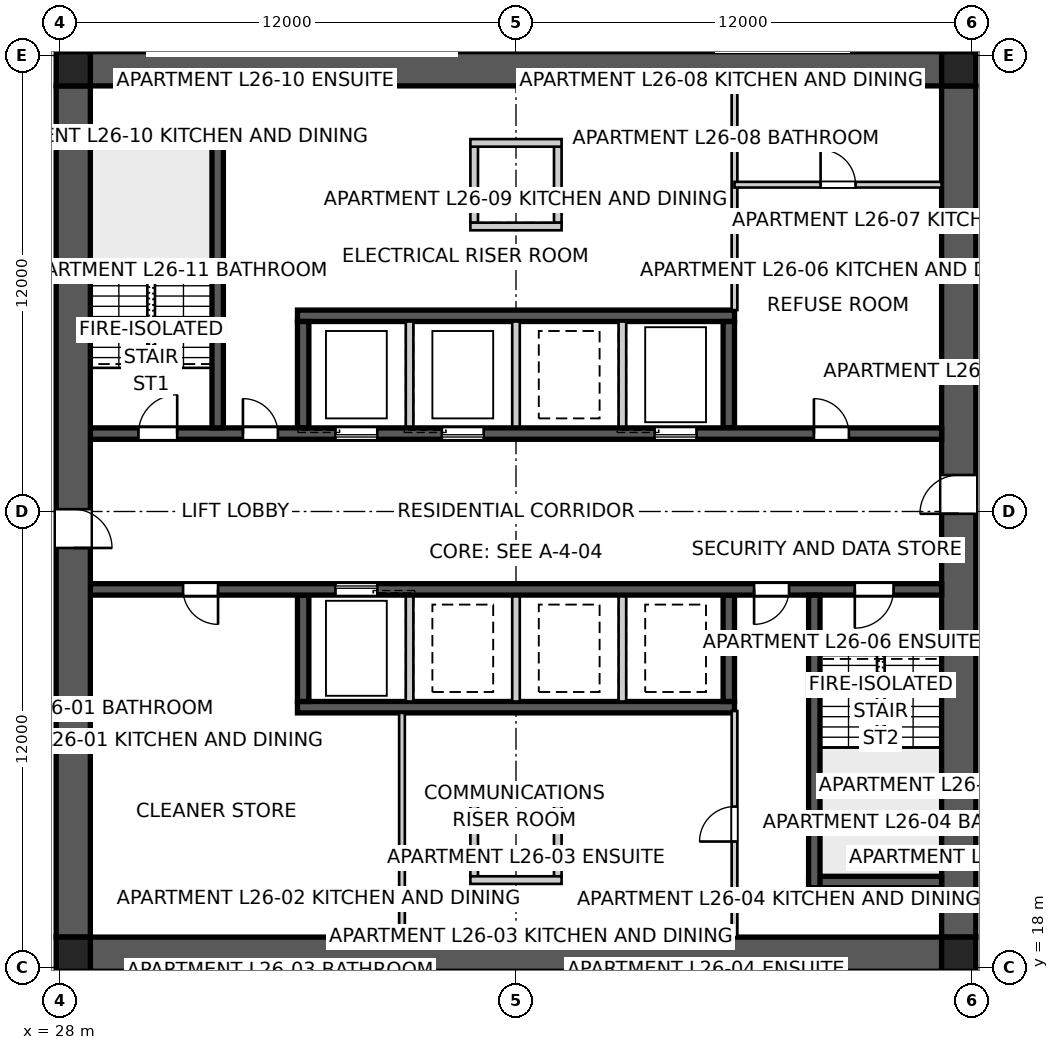
"""IFC4 building model, lengths in metres.
Left out: names, types, materials, properties, quantities, classifications, styles, units other than length and angle.
Written with IfcOpenShell. Run it as: python <this file> out.ifc"""

import sys

from ifc_helpers import new_model, si_unit, direction, frame, frame_2d, origin, origin_2d, place, context, subcontext, project, spatial, polyline, rectangle, outline, extrude, element, fill, save


model = new_model("IFC4")
c1 = context("Model", 3, precision=1e-05, world=origin(), true_north=direction((0.0, 1.0)))
c2 = subcontext(c1, "Body", "Model", "MODEL_VIEW")
j1 = project(units=[si_unit("LENGTHUNIT", "METRE"), si_unit("PLANEANGLEUNIT", "RADIAN")], contexts=[c1])
p1 = place(None, origin())
s1 = spatial("IfcSite", under=j1, at=p1, CompositionType="ELEMENT")
p2 = place(p1, origin())
s2 = spatial("IfcBuilding", under=s1, at=p2, CompositionType="ELEMENT")
p3 = place(p2, frame((0.0, 0.0, 96.4)))
s3 = spatial("IfcBuildingStorey", under=s2, at=p3, CompositionType="ELEMENT", Elevation=96.4)
for number, where, z_axis, x_axis in (
    (1, (28.8, 41.65, 0.0), (0.0, 0.0, 1.0), (1.0, 0.0, 0.0)),
    (2, (51.2, 18.35, 0.0), (0.0, 0.0, 1.0), (-1.0, 0.0, 0.0)),
):
    element("IfcWall", number, at=place(p3, frame(where, z_axis=z_axis, x_axis=x_axis)), inside=s3, PredefinedType="SHEAR", context=c2, shape_type="SweptSolid", body=[
        extrude(outline(polyline([(0.0, -0.45), (22.4, -0.45), (22.4, -0.025), (22.85, -0.025), (22.85, 0.025), (22.4, 0.025), (22.4, 0.45), (0.0, 0.45), (0.0, 0.025), (-0.45, 0.025), (-0.45, -0.025), (0.0, -0.025), (0.0, -0.45)])), origin(), (0.0, 0.0, 1.0), 3.4),
    ])
p4 = place(p3, frame((51.65, 18.8, 0.0), z_axis=(0.0, 0.0, 1.0), x_axis=(0.0, 1.0, 0.0)))
e3 = element("IfcWall", 3, at=p4, inside=s3, PredefinedType="SHEAR", context=c2, shape_type="SweptSolid", body=[
    extrude(outline(polyline([(0.0, -0.45), (22.4, -0.45), (22.4, -0.025), (22.85, -0.025), (22.85, 0.025), (22.4, 0.025), (22.4, 0.45), (0.0, 0.45), (0.0, 0.025), (-0.45, 0.025), (-0.45, -0.025), (0.0, -0.025), (0.0, -0.45)])), origin(), (0.0, 0.0, 1.0), 3.4),
])
p5 = place(p4, frame((11.14, 0.0, 0.0)))
e4 = element("IfcOpeningElement", 4, at=p5, cuts=e3, PredefinedType="OPENING", context=c2, shape_type="SweptSolid", body=[
    extrude(rectangle(XDim=1.02, YDim=2.4, at=frame_2d((0.51, 1.2))), frame((0.0, 0.46, 0.0), z_axis=(0.0, -1.0, 0.0), x_axis=(1.0, 0.0, 0.0)), (0.0, 0.0, 1.0), 0.92),
])
p6 = place(p3, frame((28.35, 41.2, 0.0), z_axis=(0.0, 0.0, 1.0), x_axis=(0.0, -1.0, 0.0)))
e5 = element("IfcWall", 5, at=p6, inside=s3, PredefinedType="SHEAR", context=c2, shape_type="SweptSolid", body=[
    extrude(outline(polyline([(0.0, -0.45), (22.4, -0.45), (22.4, -0.025), (22.85, -0.025), (22.85, 0.025), (22.4, 0.025), (22.4, 0.45), (0.0, 0.45), (0.0, 0.025), (-0.45, 0.025), (-0.45, -0.025), (0.0, -0.025), (0.0, -0.45)])), origin(), (0.0, 0.0, 1.0), 3.4),
])
p7 = place(p6, frame((11.14, 0.0, 0.0)))
e6 = element("IfcOpeningElement", 6, at=p7, cuts=e5, PredefinedType="OPENING", context=c2, shape_type="SweptSolid", body=[
    extrude(rectangle(XDim=1.02, YDim=2.4, at=frame_2d((0.51, 1.2))), frame((0.0, 0.46, 0.0), z_axis=(0.0, -1.0, 0.0), x_axis=(1.0, 0.0, 0.0)), (0.0, 0.0, 1.0), 0.92),
])
p8 = place(p3, frame((28.8, 32.05, 0.0), z_axis=(0.0, 0.0, 1.0), x_axis=(1.0, 0.0, 0.0)))
e7 = element("IfcWall", 7, at=p8, inside=s3, PredefinedType="SHEAR", context=c2, shape_type="SweptSolid", body=[
    extrude(rectangle(XDim=22.4, YDim=0.3, at=frame_2d((11.2, 0.0))), origin(), (0.0, 0.0, 1.0), 3.4),
])
p9 = place(p8, frame((19.04, 0.0, 0.0)))
e8 = element("IfcOpeningElement", 8, at=p9, cuts=e7, PredefinedType="OPENING", context=c2, shape_type="SweptSolid", body=[
    extrude(rectangle(XDim=0.92, YDim=2.1, at=frame_2d((0.46, 1.05))), frame((0.0, 0.16, 0.0), z_axis=(0.0, -1.0, 0.0), x_axis=(1.0, 0.0, 0.0)), (0.0, 0.0, 1.0), 0.32),
])
p10 = place(p8, frame((1.265, 0.0, 0.0)))
e9 = element("IfcOpeningElement", 9, at=p10, cuts=e7, PredefinedType="OPENING", context=c2, shape_type="SweptSolid", body=[
    extrude(rectangle(XDim=1.02, YDim=2.1, at=frame_2d((0.51, 1.05))), frame((0.0, 0.16, 0.0), z_axis=(0.0, -1.0, 0.0), x_axis=(1.0, 0.0, 0.0)), (0.0, 0.0, 1.0), 0.32),
])
p11 = place(p8, frame((4.015, 0.0, 0.0)))
e10 = element("IfcOpeningElement", 10, at=p11, cuts=e7, PredefinedType="OPENING", context=c2, shape_type="SweptSolid", body=[
    extrude(rectangle(XDim=0.92, YDim=2.1, at=frame_2d((0.46, 1.05))), frame((0.0, 0.16, 0.0), z_axis=(0.0, -1.0, 0.0), x_axis=(1.0, 0.0, 0.0)), (0.0, 0.0, 1.0), 0.32),
])
p12 = place(p8, frame((6.45, 0.0, 0.0)))
e11 = element("IfcOpeningElement", 11, at=p12, cuts=e7, PredefinedType="OPENING", context=c2, shape_type="SweptSolid", body=[
    extrude(rectangle(XDim=1.1, YDim=2.1, at=frame_2d((0.55, 1.05))), frame((0.0, 0.16, 0.0), z_axis=(0.0, -1.0, 0.0), x_axis=(1.0, 0.0, 0.0)), (0.0, 0.0, 1.0), 0.32),
])
p13 = place(p8, frame((9.25, 0.0, 0.0)))
e12 = element("IfcOpeningElement", 12, at=p13, cuts=e7, PredefinedType="OPENING", context=c2, shape_type="SweptSolid", body=[
    extrude(rectangle(XDim=1.1, YDim=2.1, at=frame_2d((0.55, 1.05))), frame((0.0, 0.16, 0.0), z_axis=(0.0, -1.0, 0.0), x_axis=(1.0, 0.0, 0.0)), (0.0, 0.0, 1.0), 0.32),
])
p14 = place(p8, frame((14.85, 0.0, 0.0)))
e13 = element("IfcOpeningElement", 13, at=p14, cuts=e7, PredefinedType="OPENING", context=c2, shape_type="SweptSolid", body=[
    extrude(rectangle(XDim=1.1, YDim=2.1, at=frame_2d((0.55, 1.05))), frame((0.0, 0.16, 0.0), z_axis=(0.0, -1.0, 0.0), x_axis=(1.0, 0.0, 0.0)), (0.0, 0.0, 1.0), 0.32),
])
p15 = place(p3, frame((51.2, 27.95, 0.0), z_axis=(0.0, 0.0, 1.0), x_axis=(-1.0, 0.0, 0.0)))
e14 = element("IfcWall", 14, at=p15, inside=s3, PredefinedType="SHEAR", context=c2, shape_type="SweptSolid", body=[
    extrude(rectangle(XDim=22.4, YDim=0.3, at=frame_2d((11.2, 0.0))), origin(), (0.0, 0.0, 1.0), 3.4),
])
p16 = place(p15, frame((19.04, 0.0, 0.0)))
e15 = element("IfcOpeningElement", 15, at=p16, cuts=e14, PredefinedType="OPENING", context=c2, shape_type="SweptSolid", body=[
    extrude(rectangle(XDim=0.92, YDim=2.1, at=frame_2d((0.46, 1.05))), frame((0.0, 0.16, 0.0), z_axis=(0.0, -1.0, 0.0), x_axis=(1.0, 0.0, 0.0)), (0.0, 0.0, 1.0), 0.32),
])
p17 = place(p15, frame((1.265, 0.0, 0.0)))
e16 = element("IfcOpeningElement", 16, at=p17, cuts=e14, PredefinedType="OPENING", context=c2, shape_type="SweptSolid", body=[
    extrude(rectangle(XDim=1.02, YDim=2.1, at=frame_2d((0.51, 1.05))), frame((0.0, 0.16, 0.0), z_axis=(0.0, -1.0, 0.0), x_axis=(1.0, 0.0, 0.0)), (0.0, 0.0, 1.0), 0.32),
])
p18 = place(p15, frame((4.015, 0.0, 0.0)))
e17 = element("IfcOpeningElement", 17, at=p18, cuts=e14, PredefinedType="OPENING", context=c2, shape_type="SweptSolid", body=[
    extrude(rectangle(XDim=0.92, YDim=2.1, at=frame_2d((0.46, 1.05))), frame((0.0, 0.16, 0.0), z_axis=(0.0, -1.0, 0.0), x_axis=(1.0, 0.0, 0.0)), (0.0, 0.0, 1.0), 0.32),
])
p19 = place(p15, frame((14.85, 0.0, 0.0)))
e18 = element("IfcOpeningElement", 18, at=p19, cuts=e14, PredefinedType="OPENING", context=c2, shape_type="SweptSolid", body=[
    extrude(rectangle(XDim=1.1, YDim=2.1, at=frame_2d((0.55, 1.05))), frame((0.0, 0.16, 0.0), z_axis=(0.0, -1.0, 0.0), x_axis=(1.0, 0.0, 0.0)), (0.0, 0.0, 1.0), 0.32),
])
for number, where, z_axis, x_axis in (
    (19, (34.25, 35.15, 0.0), (0.0, 0.0, 1.0), (1.0, 0.0, 0.0)),
    (20, (45.75, 24.85, 0.0), (0.0, 0.0, 1.0), (-1.0, 0.0, 0.0)),
):
    element("IfcWall", number, at=place(p3, frame(where, z_axis=z_axis, x_axis=x_axis)), inside=s3, PredefinedType="SHEAR", context=c2, shape_type="SweptSolid", body=[
        extrude(rectangle(XDim=11.5, YDim=0.3, at=frame_2d((5.75, 0.0))), origin(), (0.0, 0.0, 1.0), 3.4),
    ])
for number, where, z_axis, x_axis in (
    (21, (34.4, 32.2, 0.0), (0.0, 0.0, 1.0), (0.0, 1.0, 0.0)),
    (22, (45.6, 27.8, 0.0), (0.0, 0.0, 1.0), (0.0, -1.0, 0.0)),
):
    element("IfcWall", number, at=place(p3, frame(where, z_axis=z_axis, x_axis=x_axis)), inside=s3, PredefinedType="SHEAR", context=c2, shape_type="SweptSolid", body=[
        extrude(rectangle(XDim=2.8, YDim=0.3, at=frame_2d((1.4, 0.0))), origin(), (0.0, 0.0, 1.0), 3.4),
    ])
for number, where, z_axis, x_axis in (
    (23, (37.2, 32.2, 0.0), (0.0, 0.0, 1.0), (0.0, 1.0, 0.0)),
    (24, (42.8, 27.8, 0.0), (0.0, 0.0, 1.0), (0.0, -1.0, 0.0)),
    (25, (40.0, 32.2, 0.0), (0.0, 0.0, 1.0), (0.0, 1.0, 0.0)),
    (26, (40.0, 27.8, 0.0), (0.0, 0.0, 1.0), (0.0, -1.0, 0.0)),
    (27, (42.8, 32.2, 0.0), (0.0, 0.0, 1.0), (0.0, 1.0, 0.0)),
    (28, (37.2, 27.8, 0.0), (0.0, 0.0, 1.0), (0.0, -1.0, 0.0)),
):
    element("IfcWall", number, at=place(p3, frame(where, z_axis=z_axis, x_axis=x_axis)), inside=s3, PredefinedType="SOLIDWALL", context=c2, shape_type="SweptSolid", body=[
        extrude(rectangle(XDim=2.8, YDim=0.2, at=frame_2d((1.4, 0.0))), origin(), (0.0, 0.0, 1.0), 3.4),
    ])
for number, where, z_axis, x_axis in (
    (29, (45.6, 32.2, 0.0), (0.0, 0.0, 1.0), (0.0, 1.0, 0.0)),
    (30, (34.4, 27.8, 0.0), (0.0, 0.0, 1.0), (0.0, -1.0, 0.0)),
):
    element("IfcWall", number, at=place(p3, frame(where, z_axis=z_axis, x_axis=x_axis)), inside=s3, PredefinedType="SHEAR", context=c2, shape_type="SweptSolid", body=[
        extrude(rectangle(XDim=2.8, YDim=0.3, at=frame_2d((1.4, 0.0))), origin(), (0.0, 0.0, 1.0), 3.4),
    ])
p20 = place(p3, frame((32.15, 32.2, 0.0), z_axis=(0.0, 0.0, 1.0), x_axis=(0.0, 1.0, 0.0)))
e31 = element("IfcWall", 31, at=p20, inside=s3, PredefinedType="SHEAR", context=c2, shape_type="SweptSolid", body=[
    extrude(rectangle(XDim=7.7, YDim=0.3, at=frame_2d((3.85, 0.0))), origin(), (0.0, 0.0, 1.0), 3.4),
])
p21 = place(p3, frame((28.8, 39.75, 0.0), z_axis=(0.0, 0.0, 1.0), x_axis=(1.0, 0.0, 0.0)))
e32 = element("IfcWall", 32, at=p21, inside=s3, PredefinedType="SHEAR", context=c2, shape_type="SweptSolid", body=[
    extrude(rectangle(XDim=3.5, YDim=0.3, at=frame_2d((1.75, 0.0))), origin(), (0.0, 0.0, 1.0), 3.4),
])
p22 = place(p3, frame((47.85, 27.8, 0.0), z_axis=(0.0, 0.0, 1.0), x_axis=(0.0, -1.0, 0.0)))
e33 = element("IfcWall", 33, at=p22, inside=s3, PredefinedType="SHEAR", context=c2, shape_type="SweptSolid", body=[
    extrude(rectangle(XDim=7.7, YDim=0.3, at=frame_2d((3.85, 0.0))), origin(), (0.0, 0.0, 1.0), 3.4),
])
p23 = place(p3, frame((51.2, 20.25, 0.0), z_axis=(0.0, 0.0, 1.0), x_axis=(-1.0, 0.0, 0.0)))
e34 = element("IfcWall", 34, at=p23, inside=s3, PredefinedType="SHEAR", context=c2, shape_type="SweptSolid", body=[
    extrude(rectangle(XDim=3.5, YDim=0.3, at=frame_2d((1.75, 0.0))), origin(), (0.0, 0.0, 1.0), 3.4),
])
for number, where, z_axis, x_axis in (
    (35, (38.9, 37.6, 0.0), (0.0, 0.0, 1.0), (0.0, 1.0, 0.0)),
    (36, (41.1, 37.6, 0.0), (0.0, 0.0, 1.0), (0.0, 1.0, 0.0)),
):
    element("IfcWall", number, at=place(p3, frame(where, z_axis=z_axis, x_axis=x_axis)), inside=s3, PredefinedType="SOLIDWALL", context=c2, shape_type="SweptSolid", body=[
        extrude(rectangle(XDim=2.0, YDim=0.2, at=frame_2d((1.0, 0.0))), origin(), (0.0, 0.0, 1.0), 3.4),
    ])
for number, where, z_axis, x_axis in (
    (37, (38.8, 37.5, 0.0), (0.0, 0.0, 1.0), (1.0, 0.0, 0.0)),
    (38, (38.8, 39.7, 0.0), (0.0, 0.0, 1.0), (1.0, 0.0, 0.0)),
):
    element("IfcWall", number, at=place(p3, frame(where, z_axis=z_axis, x_axis=x_axis)), inside=s3, PredefinedType="SOLIDWALL", context=c2, shape_type="SweptSolid", body=[
        extrude(rectangle(XDim=2.4, YDim=0.2, at=frame_2d((1.2, 0.0))), origin(), (0.0, 0.0, 1.0), 3.4),
    ])
for number, where, z_axis, x_axis in (
    (39, (38.9, 22.4, 0.0), (0.0, 0.0, 1.0), (0.0, -1.0, 0.0)),
    (40, (41.1, 22.4, 0.0), (0.0, 0.0, 1.0), (0.0, -1.0, 0.0)),
):
    element("IfcWall", number, at=place(p3, frame(where, z_axis=z_axis, x_axis=x_axis)), inside=s3, PredefinedType="SOLIDWALL", context=c2, shape_type="SweptSolid", body=[
        extrude(rectangle(XDim=2.0, YDim=0.2, at=frame_2d((1.0, 0.0))), origin(), (0.0, 0.0, 1.0), 3.4),
    ])
for number, where, z_axis, x_axis in (
    (41, (38.8, 22.5, 0.0), (0.0, 0.0, 1.0), (1.0, 0.0, 0.0)),
    (42, (38.8, 20.3, 0.0), (0.0, 0.0, 1.0), (1.0, 0.0, 0.0)),
):
    element("IfcWall", number, at=place(p3, frame(where, z_axis=z_axis, x_axis=x_axis)), inside=s3, PredefinedType="SOLIDWALL", context=c2, shape_type="SweptSolid", body=[
        extrude(rectangle(XDim=2.4, YDim=0.2, at=frame_2d((1.2, 0.0))), origin(), (0.0, 0.0, 1.0), 3.4),
    ])
for number, where, z_axis, x_axis in (
    (43, (28.35, 18.35, 0.0), (0.0, 0.0, 1.0), (1.0, 0.0, 0.0)),
    (44, (51.65, 18.35, 0.0), (0.0, 0.0, 1.0), (1.0, 0.0, 0.0)),
    (45, (51.65, 41.65, 0.0), (0.0, 0.0, 1.0), (1.0, 0.0, 0.0)),
    (46, (28.35, 41.65, 0.0), (0.0, 0.0, 1.0), (1.0, 0.0, 0.0)),
):
    element("IfcColumn", number, at=place(p3, frame(where, z_axis=z_axis, x_axis=x_axis)), inside=s3, PredefinedType="COLUMN", context=c2, shape_type="SweptSolid", body=[
        extrude(rectangle(XDim=0.9, YDim=0.9, at=origin_2d()), origin(), (0.0, 0.0, 1.0), 3.4),
    ])
p24 = place(p3, frame((45.75, 41.2, 0.0), z_axis=(0.0, 0.0, 1.0), x_axis=(0.0, -1.0, 0.0)))
e47 = element("IfcWall", 47, at=p24, inside=s3, PredefinedType="SOLIDWALL", context=c2, shape_type="SweptSolid", body=[
    extrude(rectangle(XDim=5.9, YDim=0.15, at=frame_2d((2.95, 0.0))), origin(), (0.0, 0.0, 1.0), 3.25),
])
p25 = place(p3, frame((45.75, 38.6, 0.0), z_axis=(0.0, 0.0, 1.0), x_axis=(1.0, 0.0, 0.0)))
e48 = element("IfcWall", 48, at=p25, inside=s3, PredefinedType="SOLIDWALL", context=c2, shape_type="SweptSolid", body=[
    extrude(rectangle(XDim=5.45, YDim=0.15, at=frame_2d((2.725, 0.0))), origin(), (0.0, 0.0, 1.0), 3.25),
])
p26 = place(p25, frame((2.265, 0.0, 0.0)))
e49 = element("IfcOpeningElement", 49, at=p26, cuts=e48, PredefinedType="OPENING", context=c2, shape_type="SweptSolid", body=[
    extrude(rectangle(XDim=0.92, YDim=2.1, at=frame_2d((0.46, 1.05))), frame((0.0, 0.085, 0.0), z_axis=(0.0, -1.0, 0.0), x_axis=(1.0, 0.0, 0.0)), (0.0, 0.0, 1.0), 0.17),
])
p27 = place(p3, frame((45.75, 18.8, 0.0), z_axis=(0.0, 0.0, 1.0), x_axis=(0.0, 1.0, 0.0)))
e50 = element("IfcWall", 50, at=p27, inside=s3, PredefinedType="SOLIDWALL", context=c2, shape_type="SweptSolid", body=[
    extrude(rectangle(XDim=5.95, YDim=0.15, at=frame_2d((2.975, 0.0))), origin(), (0.0, 0.0, 1.0), 3.25),
])
p28 = place(p27, frame((2.515, 0.0, 0.0)))
e51 = element("IfcOpeningElement", 51, at=p28, cuts=e50, PredefinedType="OPENING", context=c2, shape_type="SweptSolid", body=[
    extrude(rectangle(XDim=0.92, YDim=2.1, at=frame_2d((0.46, 1.05))), frame((0.0, 0.085, 0.0), z_axis=(0.0, -1.0, 0.0), x_axis=(1.0, 0.0, 0.0)), (0.0, 0.0, 1.0), 0.17),
])
p29 = place(p3, frame((37.0, 18.8, 0.0), z_axis=(0.0, 0.0, 1.0), x_axis=(0.0, 1.0, 0.0)))
e52 = element("IfcWall", 52, at=p29, inside=s3, PredefinedType="SOLIDWALL", context=c2, shape_type="SweptSolid", body=[
    extrude(rectangle(XDim=5.9, YDim=0.15, at=frame_2d((2.95, 0.0))), origin(), (0.0, 0.0, 1.0), 3.25),
])
p30 = place(p9, origin())
e53 = element("IfcDoor", 53, at=p30, inside=s3, OperationType="SINGLE_SWING_LEFT", PredefinedType="DOOR", context=c2, shape_type="SweptSolid", body=[
    extrude(rectangle(XDim=0.92, YDim=2.1, at=frame_2d((0.46, 1.05))), frame((0.0, 0.025, 0.0), z_axis=(0.0, -1.0, 0.0), x_axis=(1.0, 0.0, 0.0)), (0.0, 0.0, 1.0), 0.05),
])
fill(e8, e53)
p31 = place(p16, origin())
e54 = element("IfcDoor", 54, at=p31, inside=s3, OperationType="SINGLE_SWING_LEFT", PredefinedType="DOOR", context=c2, shape_type="SweptSolid", body=[
    extrude(rectangle(XDim=0.92, YDim=2.1, at=frame_2d((0.46, 1.05))), frame((0.0, 0.025, 0.0), z_axis=(0.0, -1.0, 0.0), x_axis=(1.0, 0.0, 0.0)), (0.0, 0.0, 1.0), 0.05),
])
fill(e15, e54)
p32 = place(p17, origin())
e55 = element("IfcDoor", 55, at=p32, inside=s3, OperationType="SINGLE_SWING_RIGHT", PredefinedType="DOOR", context=c2, shape_type="SweptSolid", body=[
    extrude(rectangle(XDim=1.02, YDim=2.1, at=frame_2d((0.51, 1.05))), frame((0.0, 0.025, 0.0), z_axis=(0.0, -1.0, 0.0), x_axis=(1.0, 0.0, 0.0)), (0.0, 0.0, 1.0), 0.05),
])
fill(e16, e55)
p33 = place(p10, origin())
e56 = element("IfcDoor", 56, at=p33, inside=s3, OperationType="SINGLE_SWING_RIGHT", PredefinedType="DOOR", context=c2, shape_type="SweptSolid", body=[
    extrude(rectangle(XDim=1.02, YDim=2.1, at=frame_2d((0.51, 1.05))), frame((0.0, 0.025, 0.0), z_axis=(0.0, -1.0, 0.0), x_axis=(1.0, 0.0, 0.0)), (0.0, 0.0, 1.0), 0.05),
])
fill(e9, e56)
p34 = place(p11, origin())
e57 = element("IfcDoor", 57, at=p34, inside=s3, OperationType="SINGLE_SWING_LEFT", PredefinedType="DOOR", context=c2, shape_type="SweptSolid", body=[
    extrude(rectangle(XDim=0.92, YDim=2.1, at=frame_2d((0.46, 1.05))), frame((0.0, 0.025, 0.0), z_axis=(0.0, -1.0, 0.0), x_axis=(1.0, 0.0, 0.0)), (0.0, 0.0, 1.0), 0.05),
])
fill(e10, e57)
p35 = place(p18, origin())
e58 = element("IfcDoor", 58, at=p35, inside=s3, OperationType="SINGLE_SWING_RIGHT", PredefinedType="DOOR", context=c2, shape_type="SweptSolid", body=[
    extrude(rectangle(XDim=0.92, YDim=2.1, at=frame_2d((0.46, 1.05))), frame((0.0, 0.025, 0.0), z_axis=(0.0, -1.0, 0.0), x_axis=(1.0, 0.0, 0.0)), (0.0, 0.0, 1.0), 0.05),
])
fill(e17, e58)
p36 = place(p26, origin())
e59 = element("IfcDoor", 59, at=p36, inside=s3, OperationType="SINGLE_SWING_LEFT", PredefinedType="DOOR", context=c2, shape_type="SweptSolid", body=[
    extrude(rectangle(XDim=0.92, YDim=2.1, at=frame_2d((0.46, 1.05))), frame((0.0, 0.025, 0.0), z_axis=(0.0, -1.0, 0.0), x_axis=(1.0, 0.0, 0.0)), (0.0, 0.0, 1.0), 0.05),
])
fill(e49, e59)
p37 = place(p28, origin())
e60 = element("IfcDoor", 60, at=p37, inside=s3, OperationType="SINGLE_SWING_LEFT", PredefinedType="DOOR", context=c2, shape_type="SweptSolid", body=[
    extrude(rectangle(XDim=0.92, YDim=2.1, at=frame_2d((0.46, 1.05))), frame((0.0, 0.025, 0.0), z_axis=(0.0, -1.0, 0.0), x_axis=(1.0, 0.0, 0.0)), (0.0, 0.0, 1.0), 0.05),
])
fill(e51, e60)
p38 = place(p5, origin())
e61 = element("IfcDoor", 61, at=p38, inside=s3, OperationType="SINGLE_SWING_LEFT", PredefinedType="DOOR", context=c2, shape_type="SweptSolid", body=[
    extrude(rectangle(XDim=1.02, YDim=2.4, at=frame_2d((0.51, 1.2))), frame((0.0, 0.025, 0.0), z_axis=(0.0, -1.0, 0.0), x_axis=(1.0, 0.0, 0.0)), (0.0, 0.0, 1.0), 0.05),
])
fill(e4, e61)
p39 = place(p7, origin())
e62 = element("IfcDoor", 62, at=p39, inside=s3, OperationType="SINGLE_SWING_RIGHT", PredefinedType="DOOR", context=c2, shape_type="SweptSolid", body=[
    extrude(rectangle(XDim=1.02, YDim=2.4, at=frame_2d((0.51, 1.2))), frame((0.0, 0.025, 0.0), z_axis=(0.0, -1.0, 0.0), x_axis=(1.0, 0.0, 0.0)), (0.0, 0.0, 1.0), 0.05),
])
fill(e6, e62)
p40 = place(p12, origin())
e63 = element("IfcDoor", 63, at=p40, inside=s3, OperationType="SLIDING_TO_LEFT", PredefinedType="DOOR", context=c2, shape_type="SweptSolid", body=[
    extrude(rectangle(XDim=1.1, YDim=2.1, at=frame_2d((0.55, 1.05))), frame((0.0, 0.025, 0.0), z_axis=(0.0, -1.0, 0.0), x_axis=(1.0, 0.0, 0.0)), (0.0, 0.0, 1.0), 0.05),
])
fill(e11, e63)
p41 = place(p13, origin())
e64 = element("IfcDoor", 64, at=p41, inside=s3, OperationType="SLIDING_TO_LEFT", PredefinedType="DOOR", context=c2, shape_type="SweptSolid", body=[
    extrude(rectangle(XDim=1.1, YDim=2.1, at=frame_2d((0.55, 1.05))), frame((0.0, 0.025, 0.0), z_axis=(0.0, -1.0, 0.0), x_axis=(1.0, 0.0, 0.0)), (0.0, 0.0, 1.0), 0.05),
])
fill(e12, e64)
p42 = place(p14, origin())
e65 = element("IfcDoor", 65, at=p42, inside=s3, OperationType="SLIDING_TO_LEFT", PredefinedType="DOOR", context=c2, shape_type="SweptSolid", body=[
    extrude(rectangle(XDim=1.1, YDim=2.1, at=frame_2d((0.55, 1.05))), frame((0.0, 0.025, 0.0), z_axis=(0.0, -1.0, 0.0), x_axis=(1.0, 0.0, 0.0)), (0.0, 0.0, 1.0), 0.05),
])
fill(e13, e65)
p43 = place(p19, origin())
e66 = element("IfcDoor", 66, at=p43, inside=s3, OperationType="SLIDING_TO_LEFT", PredefinedType="DOOR", context=c2, shape_type="SweptSolid", body=[
    extrude(rectangle(XDim=1.1, YDim=2.1, at=frame_2d((0.55, 1.05))), frame((0.0, 0.025, 0.0), z_axis=(0.0, -1.0, 0.0), x_axis=(1.0, 0.0, 0.0)), (0.0, 0.0, 1.0), 0.05),
])
fill(e18, e66)
save(model, sys.argv[1])
